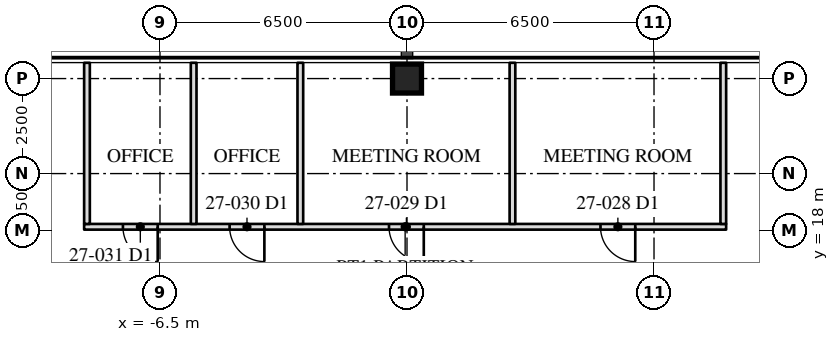
"""IFC4 building model, lengths in metres.
Left out: names, types, materials, properties, quantities, classifications, styles, units other than length and angle.
Written with IfcOpenShell. Run it as: python <this file> out.ifc"""

import sys

from ifc_helpers import new_model, si_unit, direction, frame, frame_2d, origin, origin_2d, place, context, subcontext, project, spatial, rectangle, hollow_rectangle, extrude, element, fill, save


model = new_model("IFC4")
c1 = context("Model", 3, precision=1e-05, world=origin(), true_north=direction((0.0, 1.0)))
c2 = subcontext(c1, "Body", "Model", "MODEL_VIEW")
j1 = project(units=[si_unit("LENGTHUNIT", "METRE"), si_unit("PLANEANGLEUNIT", "RADIAN")], contexts=[c1])
p1 = place(None, origin())
s1 = spatial("IfcSite", under=j1, at=p1, CompositionType="ELEMENT")
p2 = place(p1, origin())
s2 = spatial("IfcBuilding", under=s1, at=p2, CompositionType="ELEMENT")
p3 = place(p2, frame((0.0, 0.0, 117.2)))
s3 = spatial("IfcBuildingStorey", under=s2, at=p3, CompositionType="ELEMENT", Elevation=117.2)
p4 = place(p3, frame((0.0, 22.0, 0.0), z_axis=(0.0, 0.0, 1.0), x_axis=(1.0, 0.0, 0.0)))
e1 = element("IfcColumn", 1, at=p4, inside=s3, PredefinedType="COLUMN", context=c2, shape_type="SweptSolid", body=[
    extrude(hollow_rectangle(XDim=0.762, YDim=0.762, WallThickness=0.127, at=origin_2d()), origin(), (0.0, 0.0, 1.0), 4.1),
])
p5 = place(p3, frame((8.398, 18.1, 0.0), z_axis=(0.0, 0.0, 1.0), x_axis=(-1.0, 0.0, 0.0)))
e2 = element("IfcWall", 2, at=p5, inside=s3, PredefinedType="PARTITIONING", context=c2, shape_type="SweptSolid", body=[
    extrude(rectangle(XDim=16.894, YDim=0.15, at=frame_2d((8.447, 0.0))), origin(), (0.0, 0.0, 1.0), 3.91),
])
p6 = place(p5, frame((2.392, 0.0, 0.0)))
e3 = element("IfcOpeningElement", 3, at=p6, cuts=e2, PredefinedType="OPENING", context=c2, shape_type="SweptSolid", body=[
    extrude(rectangle(XDim=0.915, YDim=2.134, at=frame_2d((0.458, 1.067))), frame((0.0, 0.085, 0.0), z_axis=(0.0, -1.0, 0.0), x_axis=(1.0, 0.0, 0.0)), (0.0, 0.0, 1.0), 0.17),
])
p7 = place(p5, frame((7.957, 0.0, 0.0)))
e4 = element("IfcOpeningElement", 4, at=p7, cuts=e2, PredefinedType="OPENING", context=c2, shape_type="SweptSolid", body=[
    extrude(rectangle(XDim=0.915, YDim=2.134, at=frame_2d((0.458, 1.067))), frame((0.0, 0.085, 0.0), z_axis=(0.0, -1.0, 0.0), x_axis=(1.0, 0.0, 0.0)), (0.0, 0.0, 1.0), 0.17),
])
p8 = place(p5, frame((12.151, 0.0, 0.0)))
e5 = element("IfcOpeningElement", 5, at=p8, cuts=e2, PredefinedType="OPENING", context=c2, shape_type="SweptSolid", body=[
    extrude(rectangle(XDim=0.915, YDim=2.134, at=frame_2d((0.458, 1.067))), frame((0.0, 0.085, 0.0), z_axis=(0.0, -1.0, 0.0), x_axis=(1.0, 0.0, 0.0)), (0.0, 0.0, 1.0), 0.17),
])
p9 = place(p5, frame((14.958, 0.0, 0.0)))
e6 = element("IfcOpeningElement", 6, at=p9, cuts=e2, PredefinedType="OPENING", context=c2, shape_type="SweptSolid", body=[
    extrude(rectangle(XDim=0.915, YDim=2.134, at=frame_2d((0.458, 1.067))), frame((0.0, 0.085, 0.0), z_axis=(0.0, -1.0, 0.0), x_axis=(1.0, 0.0, 0.0)), (0.0, 0.0, 1.0), 0.17),
])
for number, where, z_axis, x_axis in (
    (7, (8.323, 18.175, 0.0), (0.0, 0.0, 1.0), (0.0, 1.0, 0.0)),
    (8, (2.775, 18.175, 0.0), (0.0, 0.0, 1.0), (0.0, 1.0, 0.0)),
    (9, (-2.807, 18.175, 0.0), (0.0, 0.0, 1.0), (0.0, 1.0, 0.0)),
    (10, (-5.614, 18.175, 0.0), (0.0, 0.0, 1.0), (0.0, 1.0, 0.0)),
    (11, (-8.421, 18.175, 0.0), (0.0, 0.0, 1.0), (0.0, 1.0, 0.0)),
):
    element("IfcWall", number, at=place(p3, frame(where, z_axis=z_axis, x_axis=x_axis)), inside=s3, PredefinedType="PARTITIONING", context=c2, shape_type="SweptSolid", body=[
        extrude(rectangle(XDim=4.24, YDim=0.15, at=frame_2d((2.12, 0.0))), origin(), (0.0, 0.0, 1.0), 3.91),
    ])
p10 = place(p6, origin())
e12 = element("IfcDoor", 12, at=p10, inside=s3, OperationType="SINGLE_SWING_LEFT", PredefinedType="DOOR", context=c2, shape_type="SweptSolid", body=[
    extrude(rectangle(XDim=0.915, YDim=2.134, at=frame_2d((0.458, 1.067))), frame((0.0, 0.025, 0.0), z_axis=(0.0, -1.0, 0.0), x_axis=(1.0, 0.0, 0.0)), (0.0, 0.0, 1.0), 0.05),
])
fill(e3, e12)
p11 = place(p7, origin())
e13 = element("IfcDoor", 13, at=p11, inside=s3, OperationType="SINGLE_SWING_LEFT", PredefinedType="DOOR", context=c2, shape_type="SweptSolid", body=[
    extrude(rectangle(XDim=0.915, YDim=2.134, at=frame_2d((0.458, 1.067))), frame((0.0, 0.025, 0.0), z_axis=(0.0, -1.0, 0.0), x_axis=(1.0, 0.0, 0.0)), (0.0, 0.0, 1.0), 0.05),
])
fill(e4, e13)
p12 = place(p8, origin())
e14 = element("IfcDoor", 14, at=p12, inside=s3, OperationType="SINGLE_SWING_LEFT", PredefinedType="DOOR", context=c2, shape_type="SweptSolid", body=[
    extrude(rectangle(XDim=0.915, YDim=2.134, at=frame_2d((0.458, 1.067))), frame((0.0, 0.025, 0.0), z_axis=(0.0, -1.0, 0.0), x_axis=(1.0, 0.0, 0.0)), (0.0, 0.0, 1.0), 0.05),
])
fill(e5, e14)
p13 = place(p9, origin())
e15 = element("IfcDoor", 15, at=p13, inside=s3, OperationType="SINGLE_SWING_LEFT", PredefinedType="DOOR", context=c2, shape_type="SweptSolid", body=[
    extrude(rectangle(XDim=0.915, YDim=2.134, at=frame_2d((0.458, 1.067))), frame((0.0, 0.025, 0.0), z_axis=(0.0, -1.0, 0.0), x_axis=(1.0, 0.0, 0.0)), (0.0, 0.0, 1.0), 0.05),
])
fill(e6, e15)
save(model, sys.argv[1])
